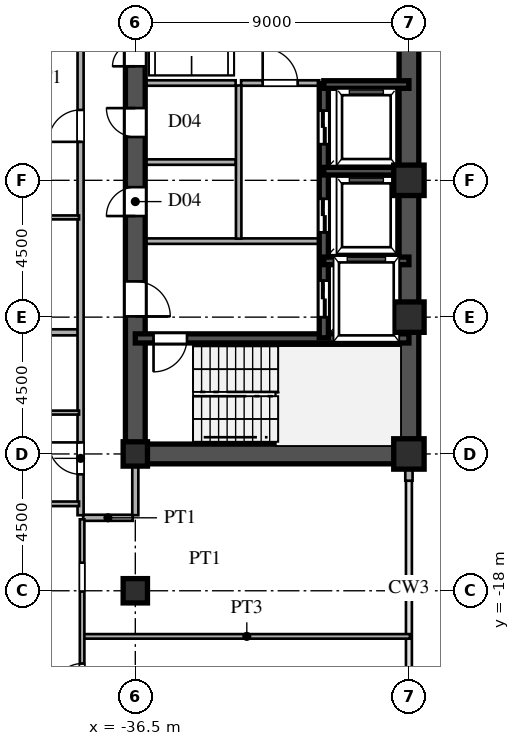
"""IFC4 building model, lengths in metres.
Left out: names, types, materials, properties, quantities, classifications, styles, units other than length and angle.
Written with IfcOpenShell. Run it as: python <this file> out.ifc"""

import sys

from ifc_helpers import new_model, si_unit, direction, frame, frame_2d, origin, origin_2d, place, context, subcontext, project, spatial, rectangle, hollow_rectangle, i_section, extrude, source, transform, mapped, element, fill, save


model = new_model("IFC4")
c1 = context("Model", 3, precision=1e-05, world=origin(), true_north=direction((0.0, 1.0)))
c2 = subcontext(c1, "Body", "Model", "MODEL_VIEW")
j1 = project(units=[si_unit("LENGTHUNIT", "METRE"), si_unit("PLANEANGLEUNIT", "RADIAN")], contexts=[c1])
p1 = place(None, origin())
s1 = spatial("IfcSite", under=j1, at=p1, CompositionType="ELEMENT")
p2 = place(p1, origin())
s2 = spatial("IfcBuilding", under=s1, at=p2, CompositionType="ELEMENT")
p3 = place(p2, frame((0.0, 0.0, 72.9)))
s3 = spatial("IfcBuildingStorey", under=s2, at=p3, CompositionType="ELEMENT", Elevation=72.9)
m1 = source(origin(), c2, "Body", "SweptSolid", [
    extrude(hollow_rectangle(XDim=1.0, YDim=1.0, WallThickness=0.042, at=origin_2d()), origin(), (0.0, 0.0, 1.0), 3.6),
])
for number, where, z_axis, x_axis in (
    (1, (-27.5, -13.5, 0.0), (0.0, 0.0, 1.0), (1.0, 0.0, 0.0)),
    (2, (-27.5, -9.0, 0.0), (0.0, 0.0, 1.0), (1.0, 0.0, 0.0)),
    (3, (-27.5, -4.5, 0.0), (0.0, 0.0, 1.0), (1.0, 0.0, 0.0)),
):
    element("IfcColumn", number, at=place(p3, frame(where, z_axis=z_axis, x_axis=x_axis)), inside=s3, PredefinedType="COLUMN", context=c2, shape_type="MappedRepresentation", body=[
        mapped(m1, transform((0.0, 0.0, 0.0), scale=1.0)),
    ])
m2 = source(origin(), c2, "Body", "SweptSolid", [
    extrude(i_section(OverallWidth=0.8, OverallDepth=0.8, WebThickness=0.032, FlangeThickness=0.05, at=origin_2d()), origin(), (0.0, 0.0, 1.0), 3.6),
])
for number, where, z_axis, x_axis in (
    (4, (-36.5, -18.0, 0.0), (0.0, 0.0, 1.0), (1.0, 0.0, 0.0)),
    (5, (-36.5, -13.5, 0.0), (0.0, 0.0, 1.0), (1.0, 0.0, 0.0)),
):
    element("IfcColumn", number, at=place(p3, frame(where, z_axis=z_axis, x_axis=x_axis)), inside=s3, PredefinedType="COLUMN", context=c2, shape_type="MappedRepresentation", body=[
        mapped(m2, transform((0.0, 0.0, 0.0), scale=1.0)),
    ])
p4 = place(p3, frame((-27.5, -14.38, 0.0), z_axis=(0.0, 0.0, 1.0), x_axis=(0.0, 1.0, 0.0)))
e6 = element("IfcWall", 6, at=p4, inside=s3, PredefinedType="SOLIDWALL", context=c2, shape_type="SweptSolid", body=[
    extrude(rectangle(XDim=0.55, YDim=0.24, at=frame_2d((0.275, 0.0))), origin(), (0.0, 0.0, 1.0), 2.88),
])
p5 = place(p3, frame((-27.5, -13.5, 0.0), z_axis=(0.0, 0.0, 1.0), x_axis=(0.0, 1.0, 0.0)))
e7 = element("IfcWall", 7, at=p5, inside=s3, PredefinedType="SHEAR", context=c2, shape_type="SweptSolid", body=[
    extrude(rectangle(XDim=12.2, YDim=0.65, at=frame_2d((6.1, 0.0))), origin(), (0.0, 0.0, 1.0), 3.38),
])
p6 = place(p3, frame((-27.5, -1.3, 0.0), z_axis=(0.0, 0.0, 1.0), x_axis=(0.0, 1.0, 0.0)))
e8 = element("IfcWall", 8, at=p6, inside=s3, PredefinedType="SHEAR", context=c2, shape_type="SweptSolid", body=[
    extrude(rectangle(XDim=2.6, YDim=0.65, at=frame_2d((1.3, 0.0))), origin(), (0.0, 0.0, 1.0), 3.38),
])
p7 = place(p3, frame((-36.5, -13.5, 0.0), z_axis=(0.0, 0.0, 1.0), x_axis=(1.0, 0.0, 0.0)))
e9 = element("IfcWall", 9, at=p7, inside=s3, PredefinedType="SHEAR", context=c2, shape_type="SweptSolid", body=[
    extrude(rectangle(XDim=9.0, YDim=0.65, at=frame_2d((4.5, 0.0))), origin(), (0.0, 0.0, 1.0), 3.38),
])
p8 = place(p3, frame((-36.5, -13.65, 0.0), z_axis=(0.0, 0.0, 1.0), x_axis=(0.0, 1.0, 0.0)))
e10 = element("IfcWall", 10, at=p8, inside=s3, PredefinedType="SHEAR", context=c2, shape_type="SweptSolid", body=[
    extrude(rectangle(XDim=7.15, YDim=0.65, at=frame_2d((3.575, 0.0))), origin(), (0.0, 0.0, 1.0), 3.38),
])
p9 = place(p8, frame((4.675, 0.0, 0.0)))
e11 = element("IfcOpeningElement", 11, at=p9, cuts=e10, PredefinedType="OPENING", context=c2, shape_type="SweptSolid", body=[
    extrude(rectangle(XDim=1.15, YDim=2.2, at=frame_2d((0.575, 1.1))), frame((0.0, 0.335, 0.0), z_axis=(0.0, -1.0, 0.0), x_axis=(1.0, 0.0, 0.0)), (0.0, 0.0, 1.0), 0.67),
])
p10 = place(p3, frame((-36.5, -1.3, 0.0), z_axis=(0.0, 0.0, 1.0), x_axis=(0.0, 1.0, 0.0)))
e12 = element("IfcWall", 12, at=p10, inside=s3, PredefinedType="SHEAR", context=c2, shape_type="SweptSolid", body=[
    extrude(rectangle(XDim=2.6, YDim=0.65, at=frame_2d((1.3, 0.0))), origin(), (0.0, 0.0, 1.0), 3.38),
])
p11 = place(p10, frame((0.55, 0.0, 0.0)))
e13 = element("IfcOpeningElement", 13, at=p11, cuts=e12, PredefinedType="OPENING", context=c2, shape_type="SweptSolid", body=[
    extrude(rectangle(XDim=1.5, YDim=2.3, at=frame_2d((0.75, 1.15))), frame((0.0, 0.335, 0.0), z_axis=(0.0, -1.0, 0.0), x_axis=(1.0, 0.0, 0.0)), (0.0, 0.0, 1.0), 0.67),
])
p12 = place(p3, frame((-36.5, -6.5, 0.0), z_axis=(0.0, 0.0, 1.0), x_axis=(0.0, 1.0, 0.0)))
e14 = element("IfcWall", 14, at=p12, inside=s3, PredefinedType="SHEAR", context=c2, shape_type="SweptSolid", body=[
    extrude(rectangle(XDim=2.6, YDim=0.65, at=frame_2d((1.3, 0.0))), origin(), (0.0, 0.0, 1.0), 3.38),
])
p13 = place(p12, frame((0.825, 0.0, 0.0)))
e15 = element("IfcOpeningElement", 15, at=p13, cuts=e14, PredefinedType="OPENING", context=c2, shape_type="SweptSolid", body=[
    extrude(rectangle(XDim=0.95, YDim=2.15, at=frame_2d((0.475, 1.075))), frame((0.0, 0.335, 0.0), z_axis=(0.0, -1.0, 0.0), x_axis=(1.0, 0.0, 0.0)), (0.0, 0.0, 1.0), 0.67),
])
p14 = place(p3, frame((-36.5, -3.9, 0.0), z_axis=(0.0, 0.0, 1.0), x_axis=(0.0, 1.0, 0.0)))
e16 = element("IfcWall", 16, at=p14, inside=s3, PredefinedType="SHEAR", context=c2, shape_type="SweptSolid", body=[
    extrude(rectangle(XDim=2.6, YDim=0.65, at=frame_2d((1.3, 0.0))), origin(), (0.0, 0.0, 1.0), 3.38),
])
p15 = place(p14, frame((0.825, 0.0, 0.0)))
e17 = element("IfcOpeningElement", 17, at=p15, cuts=e16, PredefinedType="OPENING", context=c2, shape_type="SweptSolid", body=[
    extrude(rectangle(XDim=0.95, YDim=2.15, at=frame_2d((0.475, 1.075))), frame((0.0, 0.335, 0.0), z_axis=(0.0, -1.0, 0.0), x_axis=(1.0, 0.0, 0.0)), (0.0, 0.0, 1.0), 0.67),
])
p16 = place(p3, frame((-36.5, -9.7, 0.0), z_axis=(0.0, 0.0, 1.0), x_axis=(1.0, 0.0, 0.0)))
e18 = element("IfcWall", 18, at=p16, inside=s3, PredefinedType="SHEAR", context=c2, shape_type="SweptSolid", body=[
    extrude(rectangle(XDim=9.0, YDim=0.3, at=frame_2d((4.5, 0.0))), origin(), (0.0, 0.0, 1.0), 3.38),
])
p17 = place(p16, frame((0.6, 0.0, 0.0)))
e19 = element("IfcOpeningElement", 19, at=p17, cuts=e18, PredefinedType="OPENING", context=c2, shape_type="SweptSolid", body=[
    extrude(rectangle(XDim=1.1, YDim=2.2, at=frame_2d((0.55, 1.1))), frame((0.0, 0.16, 0.0), z_axis=(0.0, -1.0, 0.0), x_axis=(1.0, 0.0, 0.0)), (0.0, 0.0, 1.0), 0.32),
])
for number, where, z_axis, x_axis in (
    (20, (-30.3, -7.15, 0.0), (0.0, 0.0, 1.0), (1.0, 0.0, 0.0)),
    (21, (-30.3, -4.2, 0.0), (0.0, 0.0, 1.0), (1.0, 0.0, 0.0)),
    (22, (-30.3, -1.35, 0.0), (0.0, 0.0, 1.0), (1.0, 0.0, 0.0)),
):
    element("IfcWall", number, at=place(p3, frame(where, z_axis=z_axis, x_axis=x_axis)), inside=s3, PredefinedType="SHEAR", context=c2, shape_type="SweptSolid", body=[
        extrude(rectangle(XDim=2.8, YDim=0.25, at=frame_2d((1.4, 0.0))), origin(), (0.0, 0.0, 1.0), 3.38),
    ])
p18 = place(p3, frame((-30.3, -9.68, 0.0), z_axis=(0.0, 0.0, 1.0), x_axis=(0.0, 1.0, 0.0)))
e23 = element("IfcWall", 23, at=p18, inside=s3, PredefinedType="SHEAR", context=c2, shape_type="SweptSolid", body=[
    extrude(rectangle(XDim=2.56, YDim=0.3, at=frame_2d((1.28, 0.0))), origin(), (0.0, 0.0, 1.0), 3.38),
])
p19 = place(p18, frame((0.68, 0.0, 0.0)))
e24 = element("IfcOpeningElement", 24, at=p19, cuts=e23, PredefinedType="OPENING", context=c2, shape_type="SweptSolid", body=[
    extrude(rectangle(XDim=1.2, YDim=2.25, at=frame_2d((0.6, 1.125))), frame((0.0, 0.16, 0.0), z_axis=(0.0, -1.0, 0.0), x_axis=(1.0, 0.0, 0.0)), (0.0, 0.0, 1.0), 0.32),
])
p20 = place(p3, frame((-30.3, -7.12, 0.0), z_axis=(0.0, 0.0, 1.0), x_axis=(0.0, 1.0, 0.0)))
e25 = element("IfcWall", 25, at=p20, inside=s3, PredefinedType="SHEAR", context=c2, shape_type="SweptSolid", body=[
    extrude(rectangle(XDim=2.92, YDim=0.3, at=frame_2d((1.46, 0.0))), origin(), (0.0, 0.0, 1.0), 3.38),
])
p21 = place(p20, frame((0.91, 0.0, 0.0)))
e26 = element("IfcOpeningElement", 26, at=p21, cuts=e25, PredefinedType="OPENING", context=c2, shape_type="SweptSolid", body=[
    extrude(rectangle(XDim=1.1, YDim=2.2, at=frame_2d((0.55, 1.1))), frame((0.0, 0.16, 0.0), z_axis=(0.0, -1.0, 0.0), x_axis=(1.0, 0.0, 0.0)), (0.0, 0.0, 1.0), 0.32),
])
p22 = place(p3, frame((-30.3, -4.2, 0.0), z_axis=(0.0, 0.0, 1.0), x_axis=(0.0, 1.0, 0.0)))
e27 = element("IfcWall", 27, at=p22, inside=s3, PredefinedType="SHEAR", context=c2, shape_type="SweptSolid", body=[
    extrude(rectangle(XDim=2.88, YDim=0.3, at=frame_2d((1.44, 0.0))), origin(), (0.0, 0.0, 1.0), 3.38),
])
p23 = place(p22, frame((0.89, 0.0, 0.0)))
e28 = element("IfcOpeningElement", 28, at=p23, cuts=e27, PredefinedType="OPENING", context=c2, shape_type="SweptSolid", body=[
    extrude(rectangle(XDim=1.1, YDim=2.2, at=frame_2d((0.55, 1.1))), frame((0.0, 0.16, 0.0), z_axis=(0.0, -1.0, 0.0), x_axis=(1.0, 0.0, 0.0)), (0.0, 0.0, 1.0), 0.32),
])
p24 = place(p3, frame((-36.15, -6.5, 0.0), z_axis=(0.0, 0.0, 1.0), x_axis=(1.0, 0.0, 0.0)))
e29 = element("IfcWall", 29, at=p24, inside=s3, PredefinedType="PARTITIONING", context=c2, shape_type="SweptSolid", body=[
    extrude(rectangle(XDim=5.7, YDim=0.18, at=frame_2d((2.85, 0.0))), origin(), (0.0, 0.0, 1.0), 3.38),
])
p25 = place(p3, frame((-33.1, -6.42, 0.0), z_axis=(0.0, 0.0, 1.0), x_axis=(0.0, 1.0, 0.0)))
e30 = element("IfcWall", 30, at=p25, inside=s3, PredefinedType="PARTITIONING", context=c2, shape_type="SweptSolid", body=[
    extrude(rectangle(XDim=5.04, YDim=0.18, at=frame_2d((2.52, 0.0))), origin(), (0.0, 0.0, 1.0), 3.38),
])
p26 = place(p3, frame((-33.02, -1.3, 0.0), z_axis=(0.0, 0.0, 1.0), x_axis=(1.0, 0.0, 0.0)))
e31 = element("IfcWall", 31, at=p26, inside=s3, PredefinedType="PARTITIONING", context=c2, shape_type="SweptSolid", body=[
    extrude(rectangle(XDim=2.57, YDim=0.18, at=frame_2d((1.285, 0.0))), origin(), (0.0, 0.0, 1.0), 3.38),
])
p27 = place(p26, frame((0.71, 0.0, 0.0)))
e32 = element("IfcOpeningElement", 32, at=p27, cuts=e31, PredefinedType="OPENING", context=c2, shape_type="SweptSolid", body=[
    extrude(rectangle(XDim=1.15, YDim=2.2, at=frame_2d((0.575, 1.1))), frame((0.0, 0.1, 0.0), z_axis=(0.0, -1.0, 0.0), x_axis=(1.0, 0.0, 0.0)), (0.0, 0.0, 1.0), 0.2),
])
for number, where, z_axis, x_axis in (
    (33, (-36.15, -1.3, 0.0), (0.0, 0.0, 1.0), (1.0, 0.0, 0.0)),
    (34, (-36.15, -3.9, 0.0), (0.0, 0.0, 1.0), (1.0, 0.0, 0.0)),
):
    element("IfcWall", number, at=place(p3, frame(where, z_axis=z_axis, x_axis=x_axis)), inside=s3, PredefinedType="PARTITIONING", context=c2, shape_type="SweptSolid", body=[
        extrude(rectangle(XDim=2.95, YDim=0.18, at=frame_2d((1.475, 0.0))), origin(), (0.0, 0.0, 1.0), 3.38),
    ])
p28 = place(p3, frame((-38.2, -19.5, 0.0), z_axis=(0.0, 0.0, 1.0), x_axis=(1.0, 0.0, 0.0)))
e35 = element("IfcWall", 35, at=p28, inside=s3, PredefinedType="PARTITIONING", context=c2, shape_type="SweptSolid", body=[
    extrude(rectangle(XDim=10.735, YDim=0.15, at=frame_2d((5.367, 0.0))), origin(), (0.0, 0.0, 1.0), 3.38),
])
p29 = place(p3, frame((-38.215, -15.6, 0.0), z_axis=(0.0, 0.0, 1.0), x_axis=(1.0, 0.0, 0.0)))
e36 = element("IfcWall", 36, at=p29, inside=s3, PredefinedType="PARTITIONING", context=c2, shape_type="SweptSolid", body=[
    extrude(rectangle(XDim=1.63, YDim=0.2, at=frame_2d((0.815, 0.0))), origin(), (0.0, 0.0, 1.0), 3.38),
])
p30 = place(p3, frame((-44.4, -15.14, 0.0), z_axis=(0.0, 0.0, 1.0), x_axis=(1.0, 0.0, 0.0)))
e37 = element("IfcWall", 37, at=p30, inside=s3, PredefinedType="PARTITIONING", context=c2, shape_type="SweptSolid", body=[
    extrude(rectangle(XDim=6.05, YDim=0.15, at=frame_2d((3.025, 0.0))), origin(), (0.0, 0.0, 1.0), 3.38),
])
p31 = place(p30, frame((2.55, 0.0, 0.0)))
e38 = element("IfcOpeningElement", 38, at=p31, cuts=e37, PredefinedType="OPENING", context=c2, shape_type="SweptSolid", body=[
    extrude(rectangle(XDim=0.95, YDim=2.15, at=frame_2d((0.475, 1.075))), frame((0.0, 0.085, 0.0), z_axis=(0.0, -1.0, 0.0), x_axis=(1.0, 0.0, 0.0)), (0.0, 0.0, 1.0), 0.17),
])
p32 = place(p3, frame((-44.4, -12.14, 0.0), z_axis=(0.0, 0.0, 1.0), x_axis=(1.0, 0.0, 0.0)))
e39 = element("IfcWall", 39, at=p32, inside=s3, PredefinedType="PARTITIONING", context=c2, shape_type="SweptSolid", body=[
    extrude(rectangle(XDim=6.05, YDim=0.13, at=frame_2d((3.025, 0.0))), origin(), (0.0, 0.0, 1.0), 3.38),
])
p33 = place(p32, frame((2.585, 0.0, 0.0)))
e40 = element("IfcOpeningElement", 40, at=p33, cuts=e39, PredefinedType="OPENING", context=c2, shape_type="SweptSolid", body=[
    extrude(rectangle(XDim=0.88, YDim=2.1, at=frame_2d((0.44, 1.05))), frame((0.0, 0.075, 0.0), z_axis=(0.0, -1.0, 0.0), x_axis=(1.0, 0.0, 0.0)), (0.0, 0.0, 1.0), 0.15),
])
p34 = place(p3, frame((-66.568, -9.5, 0.0), z_axis=(0.0, 0.0, 1.0), x_axis=(1.0, 0.0, 0.0)))
e41 = element("IfcWall", 41, at=p34, inside=s3, PredefinedType="PARTITIONING", context=c2, shape_type="SweptSolid", body=[
    extrude(rectangle(XDim=28.188, YDim=0.2, at=frame_2d((14.094, 0.0))), origin(), (0.0, 0.0, 1.0), 3.38),
])
p35 = place(p3, frame((-44.4, -5.72, 0.0), z_axis=(0.0, 0.0, 1.0), x_axis=(1.0, 0.0, 0.0)))
e42 = element("IfcWall", 42, at=p35, inside=s3, PredefinedType="PARTITIONING", context=c2, shape_type="SweptSolid", body=[
    extrude(rectangle(XDim=6.05, YDim=0.13, at=frame_2d((3.025, 0.0))), origin(), (0.0, 0.0, 1.0), 3.38),
])
p36 = place(p35, frame((2.585, 0.0, 0.0)))
e43 = element("IfcOpeningElement", 43, at=p36, cuts=e42, PredefinedType="OPENING", context=c2, shape_type="SweptSolid", body=[
    extrude(rectangle(XDim=0.88, YDim=2.1, at=frame_2d((0.44, 1.05))), frame((0.0, 0.075, 0.0), z_axis=(0.0, -1.0, 0.0), x_axis=(1.0, 0.0, 0.0)), (0.0, 0.0, 1.0), 0.15),
])
p37 = place(p3, frame((-38.3, -15.515, 0.0), z_axis=(0.0, 0.0, 1.0), x_axis=(0.0, 1.0, 0.0)))
e44 = element("IfcWall", 44, at=p37, inside=s3, PredefinedType="PARTITIONING", context=c2, shape_type="SweptSolid", body=[
    extrude(rectangle(XDim=31.03, YDim=0.2, at=frame_2d((15.515, 0.0))), origin(), (0.0, 0.0, 1.0), 3.38),
])
p38 = place(p37, frame((1.345, 0.0, 0.0)))
e45 = element("IfcOpeningElement", 45, at=p38, cuts=e44, PredefinedType="OPENING", context=c2, shape_type="SweptSolid", body=[
    extrude(rectangle(XDim=1.05, YDim=2.25, at=frame_2d((0.525, 1.125))), frame((0.0, 0.11, 0.0), z_axis=(0.0, -1.0, 0.0), x_axis=(1.0, 0.0, 0.0)), (0.0, 0.0, 1.0), 0.22),
])
p39 = place(p37, frame((12.28, 0.0, 0.0)))
e46 = element("IfcOpeningElement", 46, at=p39, cuts=e44, PredefinedType="OPENING", context=c2, shape_type="SweptSolid", body=[
    extrude(rectangle(XDim=1.05, YDim=2.25, at=frame_2d((0.525, 1.125))), frame((0.0, 0.11, 0.0), z_axis=(0.0, -1.0, 0.0), x_axis=(1.0, 0.0, 0.0)), (0.0, 0.0, 1.0), 0.22),
])
p40 = place(p37, frame((25.067, 0.0, 0.0)))
e47 = element("IfcOpeningElement", 47, at=p40, cuts=e44, PredefinedType="OPENING", context=c2, shape_type="SweptSolid", body=[
    extrude(rectangle(XDim=1.05, YDim=2.25, at=frame_2d((0.525, 1.125))), frame((0.0, 0.11, 0.0), z_axis=(0.0, -1.0, 0.0), x_axis=(1.0, 0.0, 0.0)), (0.0, 0.0, 1.0), 0.22),
])
p41 = place(p3, frame((-38.25, -22.273, 0.0), z_axis=(0.0, 0.0, 1.0), x_axis=(0.0, 1.0, 0.0)))
e48 = element("IfcWall", 48, at=p41, inside=s3, PredefinedType="PARTITIONING", context=c2, shape_type="SweptSolid", body=[
    extrude(rectangle(XDim=6.623, YDim=0.15, at=frame_2d((3.312, 0.0))), origin(), (0.0, 0.0, 1.0), 3.38),
])
p42 = place(p41, frame((0.929, 0.0, 0.0)))
e49 = element("IfcOpeningElement", 49, at=p42, cuts=e48, PredefinedType="OPENING", context=c2, shape_type="SweptSolid", body=[
    extrude(rectangle(XDim=0.95, YDim=2.15, at=frame_2d((0.475, 1.075))), frame((0.0, 0.085, 0.0), z_axis=(0.0, -1.0, 0.0), x_axis=(1.0, 0.0, 0.0)), (0.0, 0.0, 1.0), 0.17),
])
p43 = place(p41, frame((4.248, 0.0, 0.0)))
e50 = element("IfcOpeningElement", 50, at=p43, cuts=e48, PredefinedType="OPENING", context=c2, shape_type="SweptSolid", body=[
    extrude(rectangle(XDim=0.95, YDim=2.15, at=frame_2d((0.475, 1.075))), frame((0.0, 0.085, 0.0), z_axis=(0.0, -1.0, 0.0), x_axis=(1.0, 0.0, 0.0)), (0.0, 0.0, 1.0), 0.17),
])
p44 = place(p3, frame((-36.5, -15.515, 0.0), z_axis=(0.0, 0.0, 1.0), x_axis=(0.0, 1.0, 0.0)))
e51 = element("IfcWall", 51, at=p44, inside=s3, PredefinedType="PARTITIONING", context=c2, shape_type="SweptSolid", body=[
    extrude(rectangle(XDim=1.685, YDim=0.2, at=frame_2d((0.842, 0.0))), origin(), (0.0, 0.0, 1.0), 2.68),
])
m3 = source(origin(), c2, "Body", "SweptSolid", [
    extrude(rectangle(XDim=1.15, YDim=2.2, at=frame_2d((0.575, 1.1))), frame((0.0, 0.025, 0.0), z_axis=(0.0, -1.0, 0.0), x_axis=(1.0, 0.0, 0.0)), (0.0, 0.0, 1.0), 0.05),
])
p45 = place(p9, frame((1.15, 0.0, 0.0), z_axis=(0.0, 0.0, 1.0), x_axis=(-1.0, 0.0, 0.0)))
e52 = element("IfcDoor", 52, at=p45, inside=s3, OperationType="SINGLE_SWING_LEFT", PredefinedType="DOOR", context=c2, shape_type="MappedRepresentation", body=[
    mapped(m3, transform((0.0, 0.0, 0.0), scale=1.0)),
])
fill(e11, e52)
m4 = source(origin(), c2, "Body", "SweptSolid", [
    extrude(rectangle(XDim=1.5, YDim=2.3, at=frame_2d((0.75, 1.15))), frame((0.0, 0.025, 0.0), z_axis=(0.0, -1.0, 0.0), x_axis=(1.0, 0.0, 0.0)), (0.0, 0.0, 1.0), 0.05),
])
p46 = place(p11, origin())
e53 = element("IfcDoor", 53, at=p46, inside=s3, OperationType="DOUBLE_SWING_LEFT", PredefinedType="DOOR", context=c2, shape_type="MappedRepresentation", body=[
    mapped(m4, transform((0.0, 0.0, 0.0), scale=1.0)),
])
fill(e13, e53)
m5 = source(origin(), c2, "Body", "SweptSolid", [
    extrude(rectangle(XDim=0.95, YDim=2.15, at=frame_2d((0.475, 1.075))), frame((0.0, 0.025, 0.0), z_axis=(0.0, -1.0, 0.0), x_axis=(1.0, 0.0, 0.0)), (0.0, 0.0, 1.0), 0.05),
])
p47 = place(p13, origin())
e54 = element("IfcDoor", 54, at=p47, inside=s3, OperationType="SINGLE_SWING_LEFT", PredefinedType="DOOR", context=c2, shape_type="MappedRepresentation", body=[
    mapped(m5, transform((0.0, 0.0, 0.0), scale=1.0)),
])
fill(e15, e54)
p48 = place(p15, origin())
e55 = element("IfcDoor", 55, at=p48, inside=s3, OperationType="SINGLE_SWING_RIGHT", PredefinedType="DOOR", context=c2, shape_type="MappedRepresentation", body=[
    mapped(m5, transform((0.0, 0.0, 0.0), scale=1.0)),
])
fill(e17, e55)
m6 = source(origin(), c2, "Body", "SweptSolid", [
    extrude(rectangle(XDim=1.1, YDim=2.2, at=frame_2d((0.55, 1.1))), frame((0.0, 0.025, 0.0), z_axis=(0.0, -1.0, 0.0), x_axis=(1.0, 0.0, 0.0)), (0.0, 0.0, 1.0), 0.05),
])
p49 = place(p17, frame((1.1, 0.0, 0.0), z_axis=(0.0, 0.0, 1.0), x_axis=(-1.0, 0.0, 0.0)))
e56 = element("IfcDoor", 56, at=p49, inside=s3, OperationType="SINGLE_SWING_LEFT", PredefinedType="DOOR", context=c2, shape_type="MappedRepresentation", body=[
    mapped(m6, transform((0.0, 0.0, 0.0), scale=1.0)),
])
fill(e19, e56)
m7 = source(origin(), c2, "Body", "SweptSolid", [
    extrude(rectangle(XDim=1.2, YDim=2.25, at=frame_2d((0.6, 1.125))), frame((0.0, 0.025, 0.0), z_axis=(0.0, -1.0, 0.0), x_axis=(1.0, 0.0, 0.0)), (0.0, 0.0, 1.0), 0.05),
])
p50 = place(p19, origin())
e57 = element("IfcDoor", 57, at=p50, inside=s3, OperationType="DOUBLE_DOOR_SLIDING", PredefinedType="DOOR", context=c2, shape_type="MappedRepresentation", body=[
    mapped(m7, transform((0.0, 0.0, 0.0), scale=1.0)),
])
fill(e24, e57)
m8 = source(origin(), c2, "Body", "SweptSolid", [
    extrude(rectangle(XDim=1.1, YDim=2.2, at=frame_2d((0.55, 1.1))), frame((0.0, 0.025, 0.0), z_axis=(0.0, -1.0, 0.0), x_axis=(1.0, 0.0, 0.0)), (0.0, 0.0, 1.0), 0.05),
])
p51 = place(p21, origin())
e58 = element("IfcDoor", 58, at=p51, inside=s3, OperationType="DOUBLE_DOOR_SLIDING", PredefinedType="DOOR", context=c2, shape_type="MappedRepresentation", body=[
    mapped(m8, transform((0.0, 0.0, 0.0), scale=1.0)),
])
fill(e26, e58)
p52 = place(p23, origin())
e59 = element("IfcDoor", 59, at=p52, inside=s3, OperationType="DOUBLE_DOOR_SLIDING", PredefinedType="DOOR", context=c2, shape_type="MappedRepresentation", body=[
    mapped(m8, transform((0.0, 0.0, 0.0), scale=1.0)),
])
fill(e28, e59)
p53 = place(p27, origin())
e60 = element("IfcDoor", 60, at=p53, inside=s3, OperationType="SINGLE_SWING_LEFT", PredefinedType="DOOR", context=c2, shape_type="MappedRepresentation", body=[
    mapped(m3, transform((0.0, 0.0, 0.0), scale=1.0)),
])
fill(e32, e60)
m9 = source(origin(), c2, "Body", "SweptSolid", [
    extrude(rectangle(XDim=1.05, YDim=2.25, at=frame_2d((0.525, 1.125))), frame((0.0, 0.025, 0.0), z_axis=(0.0, -1.0, 0.0), x_axis=(1.0, 0.0, 0.0)), (0.0, 0.0, 1.0), 0.05),
])
p54 = place(p38, origin())
e61 = element("IfcDoor", 61, at=p54, inside=s3, OperationType="SINGLE_SWING_RIGHT", PredefinedType="DOOR", context=c2, shape_type="MappedRepresentation", body=[
    mapped(m9, transform((0.0, 0.0, 0.0), scale=1.0)),
])
fill(e45, e61)
p55 = place(p39, origin())
e62 = element("IfcDoor", 62, at=p55, inside=s3, OperationType="SINGLE_SWING_LEFT", PredefinedType="DOOR", context=c2, shape_type="MappedRepresentation", body=[
    mapped(m9, transform((0.0, 0.0, 0.0), scale=1.0)),
])
fill(e46, e62)
m10 = source(origin(), c2, "Body", "SweptSolid", [
    extrude(rectangle(XDim=0.95, YDim=2.15, at=frame_2d((0.475, 1.075))), frame((0.0, 0.025, 0.0), z_axis=(0.0, -1.0, 0.0), x_axis=(1.0, 0.0, 0.0)), (0.0, 0.0, 1.0), 0.05),
])
p56 = place(p42, origin())
e63 = element("IfcDoor", 63, at=p56, inside=s3, OperationType="SINGLE_SWING_LEFT", PredefinedType="DOOR", context=c2, shape_type="MappedRepresentation", body=[
    mapped(m10, transform((0.0, 0.0, 0.0), scale=1.0)),
])
fill(e49, e63)
save(model, sys.argv[1])
